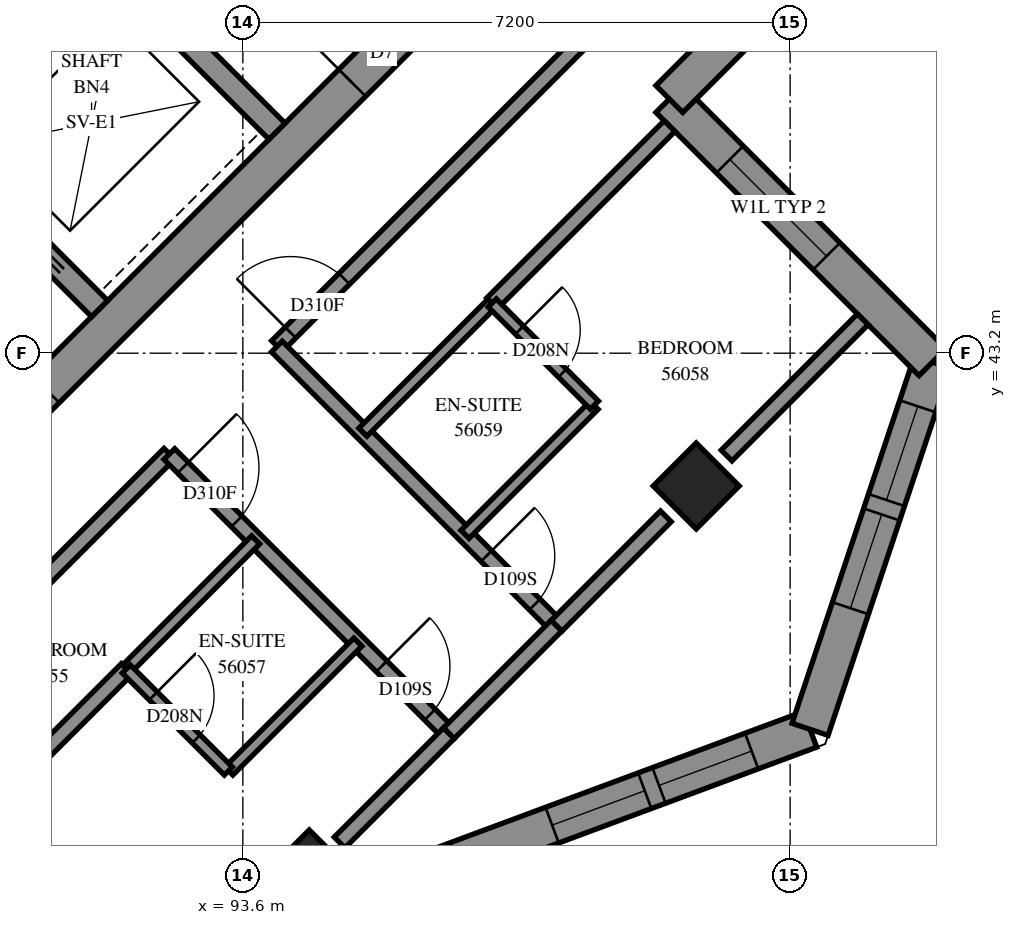
"""IFC4 building model, lengths in metres.
Left out: names, types, materials, properties, quantities, classifications, styles, units other than length and angle.
Written with IfcOpenShell. Run it as: python <this file> out.ifc"""

import sys

from ifc_helpers import new_model, si_unit, direction, frame, frame_2d, origin, origin_2d, place, context, subcontext, project, spatial, polyline, rectangle, outline, extrude, element, fill, save


model = new_model("IFC4")
c1 = context("Model", 3, precision=1e-05, world=origin(), true_north=direction((0.0, 1.0)))
c2 = subcontext(c1, "Body", "Model", "MODEL_VIEW")
j1 = project(units=[si_unit("LENGTHUNIT", "METRE"), si_unit("PLANEANGLEUNIT", "RADIAN")], contexts=[c1])
p1 = place(None, origin())
s1 = spatial("IfcSite", under=j1, at=p1, CompositionType="ELEMENT")
p2 = place(p1, origin())
s2 = spatial("IfcBuilding", under=s1, at=p2, CompositionType="ELEMENT")
p3 = place(p2, frame((0.0, 0.0, 206.6)))
s3 = spatial("IfcBuildingStorey", under=s2, at=p3, CompositionType="ELEMENT", Elevation=206.6)
for number, where, z_axis, x_axis in (
    (1, (99.565, 41.453, 0.0), (0.0, 0.0, 1.0), (0.707, -0.707, 0.0)),
    (2, (94.474, 36.362, 0.0), (0.0, 0.0, 1.0), (0.707, -0.707, 0.0)),
):
    element("IfcColumn", number, at=place(p3, frame(where, z_axis=z_axis, x_axis=x_axis)), inside=s3, PredefinedType="COLUMN", context=c2, shape_type="SweptSolid", body=[
        extrude(rectangle(XDim=0.8, YDim=0.8, at=origin_2d()), origin(), (0.0, 0.0, 1.0), 3.1),
    ])
p4 = place(p3, frame((87.013, 38.731, -0.3), z_axis=(0.0, 0.0, 1.0), x_axis=(0.7071067812, 0.7071067812, 0.0)))
e3 = element("IfcWall", 3, at=p4, inside=s3, PredefinedType="SHEAR", context=c2, shape_type="SweptSolid", body=[
    extrude(rectangle(XDim=14.4, YDim=0.5, at=frame_2d((7.2, 0.0))), origin(), (0.0, 0.0, 1.0), 2.7),
])
p5 = place(p4, frame((4.55, 0.0, 0.3)))
e4 = element("IfcOpeningElement", 4, at=p5, cuts=e3, PredefinedType="OPENING", context=c2, shape_type="SweptSolid", body=[
    extrude(rectangle(XDim=1.1, YDim=2.1, at=frame_2d((0.55, 1.05))), frame((0.0, 0.26, 0.0), z_axis=(0.0, -1.0, 0.0), x_axis=(1.0, 0.0, 0.0)), (0.0, 0.0, 1.0), 0.52),
])
p6 = place(p4, frame((11.35, 0.0, 0.3)))
e5 = element("IfcOpeningElement", 5, at=p6, cuts=e3, PredefinedType="OPENING", context=c2, shape_type="SweptSolid", body=[
    extrude(rectangle(XDim=1.1, YDim=2.1, at=frame_2d((0.55, 1.05))), frame((0.0, 0.26, 0.0), z_axis=(0.0, -1.0, 0.0), x_axis=(1.0, 0.0, 0.0)), (0.0, 0.0, 1.0), 0.52),
])
p7 = place(p3, frame((89.17, 46.332, 0.0), z_axis=(0.0, 0.0, 1.0), x_axis=(0.7071067812, 0.7071067812, 0.0)))
e6 = element("IfcWall", 6, at=p7, inside=s3, PredefinedType="SOLIDWALL", context=c2, shape_type="SweptSolid", body=[
    extrude(rectangle(XDim=3.3, YDim=0.3, at=frame_2d((1.65, 0.0))), origin(), (0.0, 0.0, 1.0), 3.1),
])
p8 = place(p3, frame((81.534, 53.969, 0.0), z_axis=(0.0, 0.0, 1.0), x_axis=(0.707103309, -0.7071102534, 0.0)))
e7 = element("IfcWall", 7, at=p8, inside=s3, PredefinedType="SOLIDWALL", context=c2, shape_type="SweptSolid", body=[
    extrude(rectangle(XDim=14.4, YDim=0.3, at=frame_2d((7.2, 0.0))), origin(), (0.0, 0.0, 1.0), 3.1),
])
p9 = place(p8, frame((1.25, 0.0, 0.0)))
e8 = element("IfcOpeningElement", 8, at=p9, cuts=e7, PredefinedType="OPENING", context=c2, shape_type="SweptSolid", body=[
    extrude(rectangle(XDim=1.1, YDim=2.1, at=frame_2d((0.55, 1.05))), frame((0.0, 0.16, 0.0), z_axis=(0.0, -1.0, 0.0), x_axis=(1.0, 0.0, 0.0)), (0.0, 0.0, 1.0), 0.32),
])
p10 = place(p8, frame((4.85, 0.0, 0.0)))
e9 = element("IfcOpeningElement", 9, at=p10, cuts=e7, PredefinedType="OPENING", context=c2, shape_type="SweptSolid", body=[
    extrude(rectangle(XDim=1.1, YDim=2.1, at=frame_2d((0.55, 1.05))), frame((0.0, 0.16, 0.0), z_axis=(0.0, -1.0, 0.0), x_axis=(1.0, 0.0, 0.0)), (0.0, 0.0, 1.0), 0.32),
])
p11 = place(p8, frame((8.45, 0.0, 0.0)))
e10 = element("IfcOpeningElement", 10, at=p11, cuts=e7, PredefinedType="OPENING", context=c2, shape_type="SweptSolid", body=[
    extrude(rectangle(XDim=1.1, YDim=2.1, at=frame_2d((0.55, 1.05))), frame((0.0, 0.16, 0.0), z_axis=(0.0, -1.0, 0.0), x_axis=(1.0, 0.0, 0.0)), (0.0, 0.0, 1.0), 0.32),
])
p12 = place(p8, frame((12.05, 0.0, 0.0)))
e11 = element("IfcOpeningElement", 11, at=p12, cuts=e7, PredefinedType="OPENING", context=c2, shape_type="SweptSolid", body=[
    extrude(rectangle(XDim=1.1, YDim=2.1, at=frame_2d((0.55, 1.05))), frame((0.0, 0.16, 0.0), z_axis=(0.0, -1.0, 0.0), x_axis=(1.0, 0.0, 0.0)), (0.0, 0.0, 1.0), 0.32),
])
p13 = place(p3, frame((88.958, 51.211, 0.0), z_axis=(0.0, 0.0, 1.0), x_axis=(0.7070998367, -0.7071137256, 0.0)))
e12 = element("IfcWall", 12, at=p13, inside=s3, PredefinedType="SOLIDWALL", context=c2, shape_type="SweptSolid", body=[
    extrude(rectangle(XDim=7.2, YDim=0.3, at=frame_2d((3.6, 0.0))), origin(), (0.0, 0.0, 1.0), 3.1),
])
p14 = place(p3, frame((96.118, 36.415, 0.0), z_axis=(0.0, 0.0, 1.0), x_axis=(0.9374238577, 0.3481903374, 0.0)))
e13 = element("IfcWall", 13, at=p14, inside=s3, PredefinedType="SOLIDWALL", context=c2, shape_type="SweptSolid", body=[
    extrude(outline(polyline([(0.115, -0.25), (5.395, -0.25), (5.155, 0.25), (-0.115, 0.25), (0.115, -0.25)])), origin(), (0.0, 0.0, 1.0), 3.1),
])
p15 = place(p14, frame((1.655, 0.0, 0.45)))
e14 = element("IfcOpeningElement", 14, at=p15, cuts=e13, PredefinedType="OPENING", context=c2, shape_type="SweptSolid", body=[
    extrude(rectangle(XDim=1.3, YDim=2.5, at=frame_2d((0.65, 1.25))), frame((0.0, 0.26, 0.0), z_axis=(0.0, -1.0, 0.0), x_axis=(1.0, 0.0, 0.0)), (0.0, 0.0, 1.0), 0.52),
])
p16 = place(p14, frame((3.155, 0.0, 0.45)))
e15 = element("IfcOpeningElement", 15, at=p16, cuts=e13, PredefinedType="OPENING", context=c2, shape_type="SweptSolid", body=[
    extrude(rectangle(XDim=1.3, YDim=2.5, at=frame_2d((0.65, 1.25))), frame((0.0, 0.26, 0.0), z_axis=(0.0, -1.0, 0.0), x_axis=(1.0, 0.0, 0.0)), (0.0, 0.0, 1.0), 0.52),
])
p17 = place(p3, frame((101.062, 38.252, 0.0), z_axis=(0.0, 0.0, 1.0), x_axis=(0.3162395484, 0.9486793705, 0.0)))
e16 = element("IfcWall", 16, at=p17, inside=s3, PredefinedType="SOLIDWALL", context=c2, shape_type="SweptSolid", body=[
    extrude(outline(polyline([(-0.12, -0.25), (5.247, -0.25), (4.938, 0.25), (0.12, 0.25), (-0.12, -0.25)])), origin(), (0.0, 0.0, 1.0), 3.1),
])
p18 = place(p17, frame((1.68, 0.0, 0.45)))
e17 = element("IfcOpeningElement", 17, at=p18, cuts=e16, PredefinedType="OPENING", context=c2, shape_type="SweptSolid", body=[
    extrude(rectangle(XDim=1.3, YDim=2.5, at=frame_2d((0.65, 1.25))), frame((0.0, 0.26, 0.0), z_axis=(0.0, -1.0, 0.0), x_axis=(1.0, 0.0, 0.0)), (0.0, 0.0, 1.0), 0.52),
])
p19 = place(p17, frame((3.18, 0.0, 0.45)))
e18 = element("IfcOpeningElement", 18, at=p19, cuts=e16, PredefinedType="OPENING", context=c2, shape_type="SweptSolid", body=[
    extrude(rectangle(XDim=1.3, YDim=2.5, at=frame_2d((0.65, 1.25))), frame((0.0, 0.26, 0.0), z_axis=(0.0, -1.0, 0.0), x_axis=(1.0, 0.0, 0.0)), (0.0, 0.0, 1.0), 0.52),
])
p20 = place(p3, frame((102.673, 43.083, 0.0), z_axis=(0.0, 0.0, 1.0), x_axis=(-0.7071067812, 0.7071067812, 0.0)))
e19 = element("IfcWall", 19, at=p20, inside=s3, PredefinedType="SOLIDWALL", context=c2, shape_type="SweptSolid", body=[
    extrude(outline(polyline([(-0.154, -0.25), (4.646, -0.25), (5.146, 0.25), (0.154, 0.25), (-0.154, -0.25)])), origin(), (0.0, 0.0, 1.0), 3.1),
])
p21 = place(p20, frame((1.97, 0.0, 0.6)))
e20 = element("IfcOpeningElement", 20, at=p21, cuts=e19, PredefinedType="OPENING", context=c2, shape_type="SweptSolid", body=[
    extrude(rectangle(XDim=1.8, YDim=1.9, at=frame_2d((0.9, 0.95))), frame((0.0, 0.26, 0.0), z_axis=(0.0, -1.0, 0.0), x_axis=(1.0, 0.0, 0.0)), (0.0, 0.0, 1.0), 0.52),
])
p22 = place(p3, frame((99.211, 46.544, 0.0), z_axis=(0.0, 0.0, 1.0), x_axis=(0.7071067812, 0.7071067812, 0.0)))
e21 = element("IfcWall", 21, at=p22, inside=s3, PredefinedType="SOLIDWALL", context=c2, shape_type="SweptSolid", body=[
    extrude(outline(polyline([(0.25, -0.25), (6.101, -0.25), (5.419, 0.25), (-0.25, 0.25), (0.25, -0.25)])), origin(), (0.0, 0.0, 1.0), 3.1),
])
p23 = place(p22, frame((1.125, 0.0, 0.6)))
e22 = element("IfcOpeningElement", 22, at=p23, cuts=e21, PredefinedType="OPENING", context=c2, shape_type="SweptSolid", body=[
    extrude(rectangle(XDim=1.8, YDim=1.9, at=frame_2d((0.9, 0.95))), frame((0.0, 0.26, 0.0), z_axis=(0.0, -1.0, 0.0), x_axis=(1.0, 0.0, 0.0)), (0.0, 0.0, 1.0), 0.52),
])
p24 = place(p3, frame((84.996, 31.971, 0.0), z_axis=(0.0, 0.0, 1.0), x_axis=(0.7072316927, 0.7069818476, 0.0)))
e23 = element("IfcWall", 23, at=p24, inside=s3, PredefinedType="PARTITIONING", context=c2, shape_type="SweptSolid", body=[
    extrude(rectangle(XDim=10.006, YDim=0.2, at=frame_2d((5.003, 0.0))), origin(), (0.0, 0.0, 1.0), 3.1),
])
p25 = place(p3, frame((94.049, 43.293, 0.0), z_axis=(0.0, 0.0, 1.0), x_axis=(0.7071067812, 0.7071067812, 0.0)))
e24 = element("IfcWall", 24, at=p25, inside=s3, PredefinedType="PARTITIONING", context=c2, shape_type="SweptSolid", body=[
    extrude(rectangle(XDim=8.2, YDim=0.2, at=frame_2d((4.1, 0.0))), origin(), (0.0, 0.0, 1.0), 3.1),
])
p26 = place(p25, frame((0.252, 0.0, 0.0)))
e25 = element("IfcOpeningElement", 25, at=p26, cuts=e24, PredefinedType="OPENING", context=c2, shape_type="SweptSolid", body=[
    extrude(rectangle(XDim=1.0, YDim=2.1, at=frame_2d((0.5, 1.05))), frame((0.0, 0.11, 0.0), z_axis=(0.0, -1.0, 0.0), x_axis=(1.0, 0.0, 0.0)), (0.0, 0.0, 1.0), 0.22),
])
p27 = place(p3, frame((86.835, 36.079, 0.0), z_axis=(0.0, 0.0, 1.0), x_axis=(0.7071067812, 0.7071067812, 0.0)))
e26 = element("IfcWall", 26, at=p27, inside=s3, PredefinedType="PARTITIONING", context=c2, shape_type="SweptSolid", body=[
    extrude(rectangle(XDim=8.2, YDim=0.2, at=frame_2d((4.1, 0.0))), origin(), (0.0, 0.0, 1.0), 3.1),
])
p28 = place(p3, frame((94.047, 43.287, 0.0), z_axis=(0.0, 0.0, 1.0), x_axis=(0.7071067812, -0.7071067812, 0.0)))
e27 = element("IfcWall", 27, at=p28, inside=s3, PredefinedType="PARTITIONING", context=c2, shape_type="SweptSolid", body=[
    extrude(rectangle(XDim=5.199, YDim=0.2, at=frame_2d((2.599, 0.0))), origin(), (0.0, 0.0, 1.0), 3.1),
])
p29 = place(p28, frame((3.898, 0.0, 0.0)))
e28 = element("IfcOpeningElement", 28, at=p29, cuts=e27, PredefinedType="OPENING", context=c2, shape_type="SweptSolid", body=[
    extrude(rectangle(XDim=0.9, YDim=2.1, at=frame_2d((0.45, 1.05))), frame((0.0, 0.11, 0.0), z_axis=(0.0, -1.0, 0.0), x_axis=(1.0, 0.0, 0.0)), (0.0, 0.0, 1.0), 0.22),
])
p30 = place(p3, frame((92.633, 41.873, 0.0), z_axis=(0.0, 0.0, 1.0), x_axis=(0.7071067812, -0.7071067812, 0.0)))
e29 = element("IfcWall", 29, at=p30, inside=s3, PredefinedType="PARTITIONING", context=c2, shape_type="SweptSolid", body=[
    extrude(rectangle(XDim=5.199, YDim=0.2, at=frame_2d((2.599, 0.0))), origin(), (0.0, 0.0, 1.0), 3.1),
])
p31 = place(p30, frame((0.253, 0.0, 0.0)))
e30 = element("IfcOpeningElement", 30, at=p31, cuts=e29, PredefinedType="OPENING", context=c2, shape_type="SweptSolid", body=[
    extrude(rectangle(XDim=1.0, YDim=2.1, at=frame_2d((0.5, 1.05))), frame((0.0, 0.11, 0.0), z_axis=(0.0, -1.0, 0.0), x_axis=(1.0, 0.0, 0.0)), (0.0, 0.0, 1.0), 0.22),
])
p32 = place(p30, frame((3.948, 0.0, 0.0)))
e31 = element("IfcOpeningElement", 31, at=p32, cuts=e29, PredefinedType="OPENING", context=c2, shape_type="SweptSolid", body=[
    extrude(rectangle(XDim=0.9, YDim=2.1, at=frame_2d((0.45, 1.05))), frame((0.0, 0.11, 0.0), z_axis=(0.0, -1.0, 0.0), x_axis=(1.0, 0.0, 0.0)), (0.0, 0.0, 1.0), 0.22),
])
p33 = place(p3, frame((96.88, 43.856, 0.0), z_axis=(0.0, 0.0, 1.0), x_axis=(0.7074098182, 0.7068036142, 0.0)))
e32 = element("IfcWall", 32, at=p33, inside=s3, PredefinedType="PARTITIONING", context=c2, shape_type="SweptSolid", body=[
    extrude(rectangle(XDim=3.299, YDim=0.2, at=frame_2d((1.65, 0.0))), origin(), (0.0, 0.0, 1.0), 3.1),
])
p34 = place(p3, frame((99.964, 41.854, 0.0), z_axis=(0.0, 0.0, 1.0), x_axis=(0.7071265121, 0.7070870497, 0.0)))
e33 = element("IfcWall", 33, at=p34, inside=s3, PredefinedType="PARTITIONING", context=c2, shape_type="SweptSolid", body=[
    extrude(rectangle(XDim=2.534, YDim=0.2, at=frame_2d((1.267, 0.0))), origin(), (0.0, 0.0, 1.0), 3.1),
])
for number, where, z_axis, x_axis in (
    (34, (96.523, 40.817, 0.0), (0.0, 0.0, 1.0), (0.707, 0.707, 0.0)),
    (35, (95.179, 42.161, 0.0), (0.0, 0.0, 1.0), (0.707, 0.707, 0.0)),
):
    element("IfcWall", number, at=place(p3, frame(where, z_axis=z_axis, x_axis=x_axis)), inside=s3, PredefinedType="PARTITIONING", context=c2, shape_type="SweptSolid", body=[
        extrude(rectangle(XDim=2.401, YDim=0.15, at=frame_2d((1.201, 0.0))), origin(), (0.0, 0.0, 1.0), 3.1),
    ])
for number, where, z_axis, x_axis in (
    (36, (92.072, 39.046, 0.0), (0.0, 0.0, 1.0), (0.707, 0.708, 0.0)),
    (37, (93.415, 37.703, 0.0), (0.0, 0.0, 1.0), (0.708, 0.707, 0.0)),
):
    element("IfcWall", number, at=place(p3, frame(where, z_axis=z_axis, x_axis=x_axis)), inside=s3, PredefinedType="PARTITIONING", context=c2, shape_type="SweptSolid", body=[
        extrude(rectangle(XDim=2.4, YDim=0.15, at=frame_2d((1.2, 0.0))), origin(), (0.0, 0.0, 1.0), 3.1),
    ])
p35 = place(p3, frame((97.727, 39.613, 0.0), z_axis=(0.0, 0.0, 1.0), x_axis=(0.7066152229, 0.7075979979, 0.0)))
e38 = element("IfcWall", 38, at=p35, inside=s3, PredefinedType="PARTITIONING", context=c2, shape_type="SweptSolid", body=[
    extrude(rectangle(XDim=2.035, YDim=0.2, at=frame_2d((1.018, 0.0))), origin(), (0.0, 0.0, 1.0), 2.6),
])
p36 = place(p3, frame((94.873, 36.763, 0.0), z_axis=(0.0, 0.0, 1.0), x_axis=(0.7071067812, 0.7071067812, 0.0)))
e39 = element("IfcWall", 39, at=p36, inside=s3, PredefinedType="PARTITIONING", context=c2, shape_type="SweptSolid", body=[
    extrude(rectangle(XDim=2.034, YDim=0.2, at=frame_2d((1.017, 0.0))), origin(), (0.0, 0.0, 1.0), 2.6),
])
p37 = place(p3, frame((96.311, 38.201, 0.0), z_axis=(0.0, 0.0, 1.0), x_axis=(0.7071067812, 0.7071067812, 0.0)))
e40 = element("IfcWall", 40, at=p37, inside=s3, PredefinedType="PARTITIONING", context=c2, shape_type="SweptSolid", body=[
    extrude(rectangle(XDim=2.0, YDim=0.2, at=frame_2d((1.0, 0.0))), origin(), (0.0, 0.0, 1.0), 2.6),
])
p38 = place(p3, frame((96.881, 43.861, 0.0), z_axis=(0.0, 0.0, 1.0), x_axis=(0.7071067812, -0.7071067812, 0.0)))
e41 = element("IfcWall", 41, at=p38, inside=s3, PredefinedType="PARTITIONING", context=c2, shape_type="SweptSolid", body=[
    extrude(rectangle(XDim=1.901, YDim=0.15, at=frame_2d((0.95, 0.0))), origin(), (0.0, 0.0, 1.0), 3.1),
])
p39 = place(p38, frame((0.505, 0.0, 0.0)))
e42 = element("IfcOpeningElement", 42, at=p39, cuts=e41, PredefinedType="OPENING", context=c2, shape_type="SweptSolid", body=[
    extrude(rectangle(XDim=0.8, YDim=2.1, at=frame_2d((0.4, 1.05))), frame((0.0, 0.085, 0.0), z_axis=(0.0, -1.0, 0.0), x_axis=(1.0, 0.0, 0.0)), (0.0, 0.0, 1.0), 0.17),
])
p40 = place(p3, frame((92.067, 39.045, 0.0), z_axis=(0.0, 0.0, 1.0), x_axis=(0.7071067812, -0.7071067812, 0.0)))
e43 = element("IfcWall", 43, at=p40, inside=s3, PredefinedType="PARTITIONING", context=c2, shape_type="SweptSolid", body=[
    extrude(rectangle(XDim=1.898, YDim=0.15, at=frame_2d((0.949, 0.0))), origin(), (0.0, 0.0, 1.0), 3.1),
])
p41 = place(p40, frame((0.501, 0.0, 0.0)))
e44 = element("IfcOpeningElement", 44, at=p41, cuts=e43, PredefinedType="OPENING", context=c2, shape_type="SweptSolid", body=[
    extrude(rectangle(XDim=0.8, YDim=2.1, at=frame_2d((0.4, 1.05))), frame((0.0, 0.085, 0.0), z_axis=(0.0, -1.0, 0.0), x_axis=(1.0, 0.0, 0.0)), (0.0, 0.0, 1.0), 0.17),
])
p42 = place(p15, origin())
e45 = element("IfcWindow", 45, at=p42, inside=s3, PartitioningType="SINGLE_PANEL", PredefinedType="WINDOW", context=c2, shape_type="SweptSolid", body=[
    extrude(rectangle(XDim=1.3, YDim=2.5, at=frame_2d((0.65, 1.25))), frame((0.0, 0.18, 0.0), z_axis=(0.0, -1.0, 0.0), x_axis=(1.0, 0.0, 0.0)), (0.0, 0.0, 1.0), 0.06),
])
fill(e14, e45)
p43 = place(p16, origin())
e46 = element("IfcWindow", 46, at=p43, inside=s3, PartitioningType="SINGLE_PANEL", PredefinedType="WINDOW", context=c2, shape_type="SweptSolid", body=[
    extrude(rectangle(XDim=1.3, YDim=2.5, at=frame_2d((0.65, 1.25))), frame((0.0, 0.18, 0.0), z_axis=(0.0, -1.0, 0.0), x_axis=(1.0, 0.0, 0.0)), (0.0, 0.0, 1.0), 0.06),
])
fill(e15, e46)
p44 = place(p18, origin())
e47 = element("IfcWindow", 47, at=p44, inside=s3, PartitioningType="SINGLE_PANEL", PredefinedType="WINDOW", context=c2, shape_type="SweptSolid", body=[
    extrude(rectangle(XDim=1.3, YDim=2.5, at=frame_2d((0.65, 1.25))), frame((0.0, 0.18, 0.0), z_axis=(0.0, -1.0, 0.0), x_axis=(1.0, 0.0, 0.0)), (0.0, 0.0, 1.0), 0.06),
])
fill(e17, e47)
p45 = place(p19, origin())
e48 = element("IfcWindow", 48, at=p45, inside=s3, PartitioningType="SINGLE_PANEL", PredefinedType="WINDOW", context=c2, shape_type="SweptSolid", body=[
    extrude(rectangle(XDim=1.3, YDim=2.5, at=frame_2d((0.65, 1.25))), frame((0.0, 0.18, 0.0), z_axis=(0.0, -1.0, 0.0), x_axis=(1.0, 0.0, 0.0)), (0.0, 0.0, 1.0), 0.06),
])
fill(e18, e48)
p46 = place(p21, origin())
e49 = element("IfcWindow", 49, at=p46, inside=s3, PartitioningType="SINGLE_PANEL", PredefinedType="WINDOW", context=c2, shape_type="SweptSolid", body=[
    extrude(rectangle(XDim=1.8, YDim=1.9, at=frame_2d((0.9, 0.95))), frame((0.0, 0.18, 0.0), z_axis=(0.0, -1.0, 0.0), x_axis=(1.0, 0.0, 0.0)), (0.0, 0.0, 1.0), 0.06),
])
fill(e20, e49)
p47 = place(p6, origin())
e50 = element("IfcDoor", 50, at=p47, inside=s3, OperationType="SINGLE_SWING_RIGHT", PredefinedType="DOOR", context=c2, shape_type="SweptSolid", body=[
    extrude(rectangle(XDim=1.1, YDim=2.1, at=frame_2d((0.55, 1.05))), frame((0.0, 0.025, 0.0), z_axis=(0.0, -1.0, 0.0), x_axis=(1.0, 0.0, 0.0)), (0.0, 0.0, 1.0), 0.05),
])
fill(e5, e50)
p48 = place(p26, origin())
e51 = element("IfcDoor", 51, at=p48, inside=s3, OperationType="SINGLE_SWING_RIGHT", PredefinedType="DOOR", context=c2, shape_type="SweptSolid", body=[
    extrude(rectangle(XDim=1.0, YDim=2.1, at=frame_2d((0.5, 1.05))), frame((0.0, 0.025, 0.0), z_axis=(0.0, -1.0, 0.0), x_axis=(1.0, 0.0, 0.0)), (0.0, 0.0, 1.0), 0.05),
])
fill(e25, e51)
p49 = place(p31, origin())
e52 = element("IfcDoor", 52, at=p49, inside=s3, OperationType="SINGLE_SWING_RIGHT", PredefinedType="DOOR", context=c2, shape_type="SweptSolid", body=[
    extrude(rectangle(XDim=1.0, YDim=2.1, at=frame_2d((0.5, 1.05))), frame((0.0, 0.025, 0.0), z_axis=(0.0, -1.0, 0.0), x_axis=(1.0, 0.0, 0.0)), (0.0, 0.0, 1.0), 0.05),
])
fill(e30, e52)
p50 = place(p32, origin())
e53 = element("IfcDoor", 53, at=p50, inside=s3, OperationType="SINGLE_SWING_LEFT", PredefinedType="DOOR", context=c2, shape_type="SweptSolid", body=[
    extrude(rectangle(XDim=0.9, YDim=2.1, at=frame_2d((0.45, 1.05))), frame((0.0, 0.025, 0.0), z_axis=(0.0, -1.0, 0.0), x_axis=(1.0, 0.0, 0.0)), (0.0, 0.0, 1.0), 0.05),
])
fill(e31, e53)
p51 = place(p41, origin())
e54 = element("IfcDoor", 54, at=p51, inside=s3, OperationType="SINGLE_SWING_RIGHT", PredefinedType="DOOR", context=c2, shape_type="SweptSolid", body=[
    extrude(rectangle(XDim=0.8, YDim=2.1, at=frame_2d((0.4, 1.05))), frame((0.0, 0.025, 0.0), z_axis=(0.0, -1.0, 0.0), x_axis=(1.0, 0.0, 0.0)), (0.0, 0.0, 1.0), 0.05),
])
fill(e44, e54)
p52 = place(p29, origin())
e55 = element("IfcDoor", 55, at=p52, inside=s3, OperationType="SINGLE_SWING_RIGHT", PredefinedType="DOOR", context=c2, shape_type="SweptSolid", body=[
    extrude(rectangle(XDim=0.9, YDim=2.1, at=frame_2d((0.45, 1.05))), frame((0.0, 0.025, 0.0), z_axis=(0.0, -1.0, 0.0), x_axis=(1.0, 0.0, 0.0)), (0.0, 0.0, 1.0), 0.05),
])
fill(e28, e55)
p53 = place(p39, origin())
e56 = element("IfcDoor", 56, at=p53, inside=s3, OperationType="SINGLE_SWING_RIGHT", PredefinedType="DOOR", context=c2, shape_type="SweptSolid", body=[
    extrude(rectangle(XDim=0.8, YDim=2.1, at=frame_2d((0.4, 1.05))), frame((0.0, 0.025, 0.0), z_axis=(0.0, -1.0, 0.0), x_axis=(1.0, 0.0, 0.0)), (0.0, 0.0, 1.0), 0.05),
])
fill(e42, e56)
save(model, sys.argv[1])
